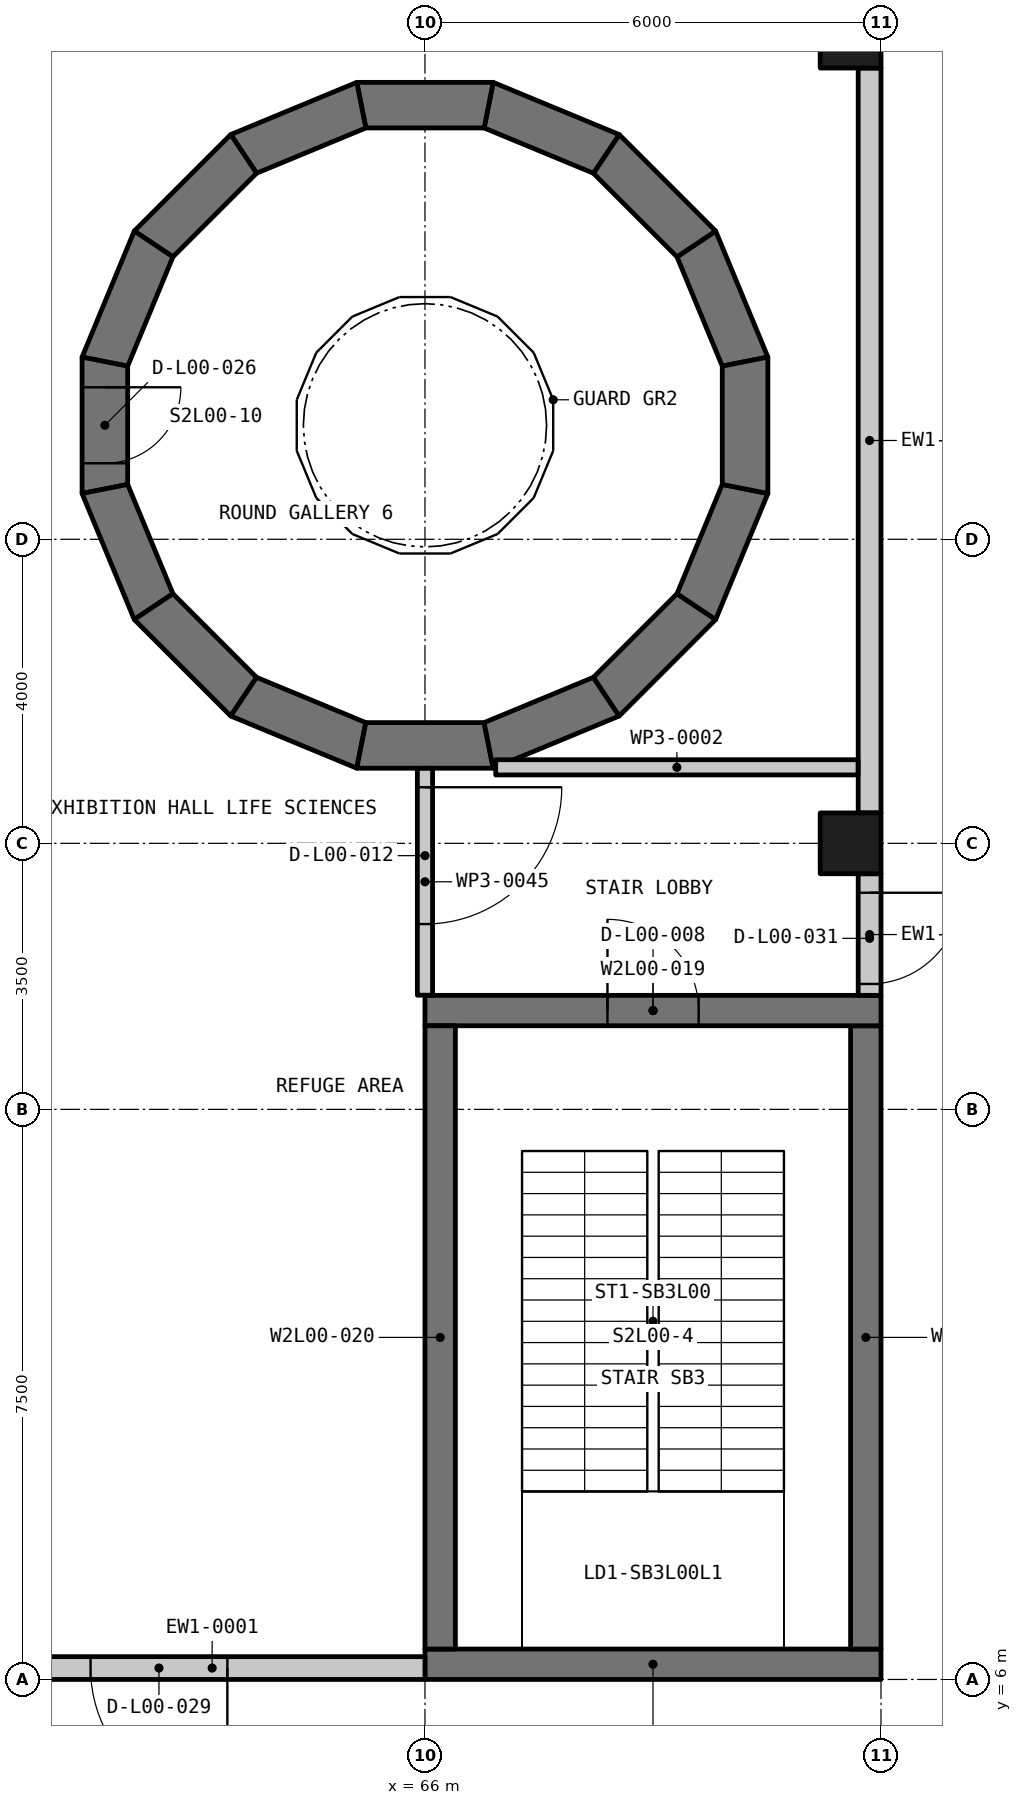
"""IFC4 building model, lengths in metres.
Left out: names, types, materials, properties, quantities, classifications, styles, units other than length and angle.
Written with IfcOpenShell. Run it as: python <this file> out.ifc"""

import sys

from ifc_helpers import new_model, si_unit, direction, frame, frame_2d, origin, origin_2d, place, context, subcontext, project, spatial, polyline, rectangle, outline, extrude, element, fill, save


model = new_model("IFC4")
c1 = context("Model", 3, precision=1e-05, world=origin(), true_north=direction((0.0, 1.0)))
c2 = subcontext(c1, "Body", "Model", "MODEL_VIEW")
j1 = project(units=[si_unit("LENGTHUNIT", "METRE"), si_unit("PLANEANGLEUNIT", "RADIAN")], contexts=[c1])
p1 = place(None, origin())
s1 = spatial("IfcSite", under=j1, at=p1, CompositionType="ELEMENT")
p2 = place(p1, origin())
s2 = spatial("IfcBuilding", under=s1, at=p2, CompositionType="ELEMENT")
p3 = place(p2, origin())
s3 = spatial("IfcBuildingStorey", under=s2, at=p3, CompositionType="ELEMENT", Elevation=0.0)
for number, where, z_axis, x_axis in (
    (1, (71.6, 17.0, -0.2), (0.0, 0.0, 1.0), (1.0, 0.0, 0.0)),
    (2, (71.6, 27.6, -0.2), (0.0, 0.0, 1.0), (1.0, 0.0, 0.0)),
):
    element("IfcColumn", number, at=place(p3, frame(where, z_axis=z_axis, x_axis=x_axis)), inside=s3, PredefinedType="COLUMN", context=c2, shape_type="SweptSolid", body=[
        extrude(rectangle(XDim=0.8, YDim=0.8, at=origin_2d()), origin(), (0.0, 0.0, 1.0), 5.9),
    ])
p4 = place(p3, frame((70.234, 23.283, -0.2), z_axis=(0.0, 0.0, 1.0), x_axis=(-0.3826441282, 0.92389581185, 0.0)))
e3 = element("IfcWall", 3, at=p4, inside=s3, PredefinedType="SHEAR", context=c2, shape_type="SweptSolid", body=[
    extrude(outline(polyline([(0.0, -0.3), (1.795, -0.3), (1.675, 0.3), (0.119, 0.3), (0.0, -0.3)])), origin(), (0.0, 0.0, 1.0), 5.9),
])
p5 = place(p3, frame((69.613, 24.844, -0.2), z_axis=(0.0, 0.0, 1.0), x_axis=(-0.707106781187, 0.707106781187, 0.0)))
e4 = element("IfcWall", 4, at=p5, inside=s3, PredefinedType="SHEAR", context=c2, shape_type="SweptSolid", body=[
    extrude(outline(polyline([(0.0, -0.3), (1.795, -0.3), (1.675, 0.3), (0.119, 0.3), (0.0, -0.3)])), origin(), (0.0, 0.0, 1.0), 5.9),
])
p6 = place(p3, frame((68.441, 26.048, -0.2), z_axis=(0.0, 0.0, 1.0), x_axis=(-0.92389581185, 0.3826441282, 0.0)))
e5 = element("IfcWall", 5, at=p6, inside=s3, PredefinedType="SHEAR", context=c2, shape_type="SweptSolid", body=[
    extrude(outline(polyline([(0.0, -0.3), (1.795, -0.3), (1.676, 0.3), (0.119, 0.3), (0.0, -0.3)])), origin(), (0.0, 0.0, 1.0), 5.9),
])
p7 = place(p3, frame((66.897, 26.712, -0.2), z_axis=(0.0, 0.0, 1.0), x_axis=(-1.0, 0.0, 0.0)))
e6 = element("IfcWall", 6, at=p7, inside=s3, PredefinedType="SHEAR", context=c2, shape_type="SweptSolid", body=[
    extrude(outline(polyline([(0.0, -0.3), (1.795, -0.3), (1.676, 0.3), (0.119, 0.3), (0.0, -0.3)])), origin(), (0.0, 0.0, 1.0), 5.9),
])
p8 = place(p3, frame((65.217, 26.734, -0.2), z_axis=(0.0, 0.0, 1.0), x_axis=(-0.92389581185, -0.3826441282, 0.0)))
e7 = element("IfcWall", 7, at=p8, inside=s3, PredefinedType="SHEAR", context=c2, shape_type="SweptSolid", body=[
    extrude(outline(polyline([(0.0, -0.3), (1.795, -0.3), (1.675, 0.3), (0.119, 0.3), (0.0, -0.3)])), origin(), (0.0, 0.0, 1.0), 5.9),
])
p9 = place(p3, frame((63.656, 26.113, -0.2), z_axis=(0.0, 0.0, 1.0), x_axis=(-0.707106781187, -0.707106781187, 0.0)))
e8 = element("IfcWall", 8, at=p9, inside=s3, PredefinedType="SHEAR", context=c2, shape_type="SweptSolid", body=[
    extrude(outline(polyline([(0.0, -0.3), (1.795, -0.3), (1.675, 0.3), (0.119, 0.3), (0.0, -0.3)])), origin(), (0.0, 0.0, 1.0), 5.9),
])
p10 = place(p3, frame((62.452, 24.941, -0.2), z_axis=(0.0, 0.0, 1.0), x_axis=(-0.3826441282, -0.92389581185, 0.0)))
e9 = element("IfcWall", 9, at=p10, inside=s3, PredefinedType="SHEAR", context=c2, shape_type="SweptSolid", body=[
    extrude(outline(polyline([(0.0, -0.3), (1.795, -0.3), (1.676, 0.3), (0.119, 0.3), (0.0, -0.3)])), origin(), (0.0, 0.0, 1.0), 5.9),
])
p11 = place(p3, frame((61.788, 23.397, -0.2), z_axis=(0.0, 0.0, 1.0), x_axis=(0.0, -1.0, 0.0)))
e10 = element("IfcWall", 10, at=p11, inside=s3, PredefinedType="SHEAR", context=c2, shape_type="SweptSolid", body=[
    extrude(outline(polyline([(0.0, -0.3), (1.795, -0.3), (1.676, 0.3), (0.119, 0.3), (0.0, -0.3)])), origin(), (0.0, 0.0, 1.0), 5.9),
])
p12 = place(p11, frame((0.397, 0.0, 0.2)))
e11 = element("IfcOpeningElement", 11, at=p12, cuts=e10, PredefinedType="OPENING", context=c2, shape_type="SweptSolid", body=[
    extrude(rectangle(XDim=1.0, YDim=2.2, at=frame_2d((0.5, 1.1))), frame((0.0, 0.31, 0.0), z_axis=(0.0, -1.0, 0.0), x_axis=(1.0, 0.0, 0.0)), (0.0, 0.0, 1.0), 0.62),
])
p13 = place(p3, frame((61.766, 21.717, -0.2), z_axis=(0.0, 0.0, 1.0), x_axis=(0.3826441282, -0.92389581185, 0.0)))
e12 = element("IfcWall", 12, at=p13, inside=s3, PredefinedType="SHEAR", context=c2, shape_type="SweptSolid", body=[
    extrude(outline(polyline([(0.0, -0.3), (1.795, -0.3), (1.675, 0.3), (0.119, 0.3), (0.0, -0.3)])), origin(), (0.0, 0.0, 1.0), 5.9),
])
p14 = place(p3, frame((62.387, 20.156, -0.2), z_axis=(0.0, 0.0, 1.0), x_axis=(0.707106781187, -0.707106781187, 0.0)))
e13 = element("IfcWall", 13, at=p14, inside=s3, PredefinedType="SHEAR", context=c2, shape_type="SweptSolid", body=[
    extrude(outline(polyline([(0.0, -0.3), (1.795, -0.3), (1.675, 0.3), (0.119, 0.3), (0.0, -0.3)])), origin(), (0.0, 0.0, 1.0), 5.9),
])
p15 = place(p3, frame((63.559, 18.952, -0.2), z_axis=(0.0, 0.0, 1.0), x_axis=(0.92389581185, -0.3826441282, 0.0)))
e14 = element("IfcWall", 14, at=p15, inside=s3, PredefinedType="SHEAR", context=c2, shape_type="SweptSolid", body=[
    extrude(outline(polyline([(0.0, -0.3), (1.795, -0.3), (1.676, 0.3), (0.119, 0.3), (0.0, -0.3)])), origin(), (0.0, 0.0, 1.0), 5.9),
])
p16 = place(p3, frame((65.103, 18.288, -0.2), z_axis=(0.0, 0.0, 1.0), x_axis=(1.0, 0.0, 0.0)))
e15 = element("IfcWall", 15, at=p16, inside=s3, PredefinedType="SHEAR", context=c2, shape_type="SweptSolid", body=[
    extrude(outline(polyline([(0.0, -0.3), (1.795, -0.3), (1.676, 0.3), (0.119, 0.3), (0.0, -0.3)])), origin(), (0.0, 0.0, 1.0), 5.9),
])
p17 = place(p3, frame((66.783, 18.266, -0.2), z_axis=(0.0, 0.0, 1.0), x_axis=(0.92389581185, 0.3826441282, 0.0)))
e16 = element("IfcWall", 16, at=p17, inside=s3, PredefinedType="SHEAR", context=c2, shape_type="SweptSolid", body=[
    extrude(outline(polyline([(0.0, -0.3), (1.795, -0.3), (1.675, 0.3), (0.119, 0.3), (0.0, -0.3)])), origin(), (0.0, 0.0, 1.0), 5.9),
])
p18 = place(p3, frame((68.344, 18.887, -0.2), z_axis=(0.0, 0.0, 1.0), x_axis=(0.707106781187, 0.707106781187, 0.0)))
e17 = element("IfcWall", 17, at=p18, inside=s3, PredefinedType="SHEAR", context=c2, shape_type="SweptSolid", body=[
    extrude(outline(polyline([(0.0, -0.3), (1.795, -0.3), (1.675, 0.3), (0.119, 0.3), (0.0, -0.3)])), origin(), (0.0, 0.0, 1.0), 5.9),
])
p19 = place(p3, frame((69.548, 20.059, -0.2), z_axis=(0.0, 0.0, 1.0), x_axis=(0.3826441282, 0.92389581185, 0.0)))
e18 = element("IfcWall", 18, at=p19, inside=s3, PredefinedType="SHEAR", context=c2, shape_type="SweptSolid", body=[
    extrude(outline(polyline([(0.0, -0.3), (1.795, -0.3), (1.676, 0.3), (0.119, 0.3), (0.0, -0.3)])), origin(), (0.0, 0.0, 1.0), 5.9),
])
p20 = place(p3, frame((70.212, 21.603, -0.2), z_axis=(0.0, 0.0, 1.0), x_axis=(0.0, 1.0, 0.0)))
e19 = element("IfcWall", 19, at=p20, inside=s3, PredefinedType="SHEAR", context=c2, shape_type="SweptSolid", body=[
    extrude(outline(polyline([(0.0, -0.3), (1.795, -0.3), (1.676, 0.3), (0.119, 0.3), (0.0, -0.3)])), origin(), (0.0, 0.0, 1.0), 5.9),
])
p21 = place(p3, frame((66.0, 6.2, -0.2), z_axis=(0.0, 0.0, 1.0), x_axis=(1.0, 0.0, 0.0)))
e20 = element("IfcWall", 20, at=p21, inside=s3, PredefinedType="SHEAR", context=c2, shape_type="SweptSolid", body=[
    extrude(rectangle(XDim=6.0, YDim=0.4, at=frame_2d((3.0, 0.0))), origin(), (0.0, 0.0, 1.0), 5.9),
])
p22 = place(p3, frame((71.8, 6.4, -0.2), z_axis=(0.0, 0.0, 1.0), x_axis=(0.0, 1.0, 0.0)))
e21 = element("IfcWall", 21, at=p22, inside=s3, PredefinedType="SHEAR", context=c2, shape_type="SweptSolid", body=[
    extrude(rectangle(XDim=8.2, YDim=0.4, at=frame_2d((4.1, 0.0))), origin(), (0.0, 0.0, 1.0), 5.9),
])
p23 = place(p3, frame((66.0, 14.8, -0.2), z_axis=(0.0, 0.0, 1.0), x_axis=(1.0, 0.0, 0.0)))
e22 = element("IfcWall", 22, at=p23, inside=s3, PredefinedType="SHEAR", context=c2, shape_type="SweptSolid", body=[
    extrude(rectangle(XDim=6.0, YDim=0.4, at=frame_2d((3.0, 0.0))), origin(), (0.0, 0.0, 1.0), 5.9),
])
p24 = place(p23, frame((2.401, 0.0, 0.2)))
e23 = element("IfcOpeningElement", 23, at=p24, cuts=e22, PredefinedType="OPENING", context=c2, shape_type="SweptSolid", body=[
    extrude(rectangle(XDim=1.2, YDim=2.2, at=frame_2d((0.6, 1.1))), frame((0.0, 0.21, 0.0), z_axis=(0.0, -1.0, 0.0), x_axis=(1.0, 0.0, 0.0)), (0.0, 0.0, 1.0), 0.42),
])
p25 = place(p3, frame((66.2, 6.4, -0.2), z_axis=(0.0, 0.0, 1.0), x_axis=(0.0, 1.0, 0.0)))
e24 = element("IfcWall", 24, at=p25, inside=s3, PredefinedType="SHEAR", context=c2, shape_type="SweptSolid", body=[
    extrude(rectangle(XDim=8.2, YDim=0.4, at=frame_2d((4.1, 0.0))), origin(), (0.0, 0.0, 1.0), 5.9),
])
p26 = place(p3, frame((66.0, 6.15, 0.0), z_axis=(0.0, 0.0, 1.0), x_axis=(-1.0, 0.0, 0.0)))
e25 = element("IfcWall", 25, at=p26, inside=s3, PredefinedType="SOLIDWALL", context=c2, shape_type="SweptSolid", body=[
    extrude(rectangle(XDim=5.6, YDim=0.3, at=frame_2d((2.8, 0.0))), origin(), (0.0, 0.0, 1.0), 4.8),
])
p27 = place(p26, frame((2.6, 0.0, 0.0)))
e26 = element("IfcOpeningElement", 26, at=p27, cuts=e25, PredefinedType="OPENING", context=c2, shape_type="SweptSolid", body=[
    extrude(rectangle(XDim=1.8, YDim=2.2, at=frame_2d((0.9, 1.1))), frame((0.0, 0.16, 0.0), z_axis=(0.0, -1.0, 0.0), x_axis=(1.0, 0.0, 0.0)), (0.0, 0.0, 1.0), 0.32),
])
p28 = place(p3, frame((71.85, 27.2, 0.0), z_axis=(0.0, 0.0, 1.0), x_axis=(0.0, -1.0, 0.0)))
e27 = element("IfcWall", 27, at=p28, inside=s3, PredefinedType="SOLIDWALL", context=c2, shape_type="SweptSolid", body=[
    extrude(rectangle(XDim=9.8, YDim=0.3, at=frame_2d((4.9, 0.0))), origin(), (0.0, 0.0, 1.0), 4.8),
])
p29 = place(p3, frame((71.85, 16.6, 0.0), z_axis=(0.0, 0.0, 1.0), x_axis=(0.0, -1.0, 0.0)))
e28 = element("IfcWall", 28, at=p29, inside=s3, PredefinedType="SOLIDWALL", context=c2, shape_type="SweptSolid", body=[
    extrude(rectangle(XDim=1.6, YDim=0.3, at=frame_2d((0.8, 0.0))), origin(), (0.0, 0.0, 1.0), 4.8),
])
p30 = place(p29, frame((0.25, 0.0, 0.0)))
e29 = element("IfcOpeningElement", 29, at=p30, cuts=e28, PredefinedType="OPENING", context=c2, shape_type="SweptSolid", body=[
    extrude(rectangle(XDim=1.2, YDim=2.2, at=frame_2d((0.6, 1.1))), frame((0.0, 0.16, 0.0), z_axis=(0.0, -1.0, 0.0), x_axis=(1.0, 0.0, 0.0)), (0.0, 0.0, 1.0), 0.32),
])
p31 = place(p3, frame((66.931, 18.0, 0.0), z_axis=(0.0, 0.0, 1.0), x_axis=(1.0, 0.0, 0.0)))
e30 = element("IfcWall", 30, at=p31, inside=s3, PredefinedType="PARTITIONING", context=c2, shape_type="SweptSolid", body=[
    extrude(rectangle(XDim=4.767, YDim=0.2, at=frame_2d((2.384, 0.0))), origin(), (0.0, 0.0, 1.0), 4.8),
])
p32 = place(p3, frame((66.0, 17.986, 0.0), z_axis=(0.0, 0.0, 1.0), x_axis=(0.0, -1.0, 0.0)))
e31 = element("IfcWall", 31, at=p32, inside=s3, PredefinedType="PARTITIONING", context=c2, shape_type="SweptSolid", body=[
    extrude(rectangle(XDim=2.984, YDim=0.2, at=frame_2d((1.492, 0.0))), origin(), (0.0, 0.0, 1.0), 4.8),
])
p33 = place(p32, frame((0.248, 0.0, 0.0)))
e32 = element("IfcOpeningElement", 32, at=p33, cuts=e31, PredefinedType="OPENING", context=c2, shape_type="SweptSolid", body=[
    extrude(rectangle(XDim=1.8, YDim=2.1, at=frame_2d((0.9, 1.05))), frame((0.0, 0.11, 0.0), z_axis=(0.0, -1.0, 0.0), x_axis=(1.0, 0.0, 0.0)), (0.0, 0.0, 1.0), 0.22),
])
p34 = place(p27, origin())
e33 = element("IfcDoor", 33, at=p34, inside=s3, OperationType="SINGLE_SWING_LEFT", PredefinedType="DOOR", context=c2, shape_type="SweptSolid", body=[
    extrude(rectangle(XDim=1.8, YDim=2.2, at=frame_2d((0.9, 1.1))), frame((0.0, 0.025, 0.0), z_axis=(0.0, -1.0, 0.0), x_axis=(1.0, 0.0, 0.0)), (0.0, 0.0, 1.0), 0.05),
])
fill(e26, e33)
p35 = place(p30, origin())
e34 = element("IfcDoor", 34, at=p35, inside=s3, OperationType="SINGLE_SWING_RIGHT", PredefinedType="DOOR", context=c2, shape_type="SweptSolid", body=[
    extrude(rectangle(XDim=1.2, YDim=2.2, at=frame_2d((0.6, 1.1))), frame((0.0, 0.025, 0.0), z_axis=(0.0, -1.0, 0.0), x_axis=(1.0, 0.0, 0.0)), (0.0, 0.0, 1.0), 0.05),
])
fill(e29, e34)
p36 = place(p24, origin())
e35 = element("IfcDoor", 35, at=p36, inside=s3, OperationType="SINGLE_SWING_RIGHT", PredefinedType="DOOR", context=c2, shape_type="SweptSolid", body=[
    extrude(rectangle(XDim=1.2, YDim=2.2, at=frame_2d((0.6, 1.1))), frame((0.0, 0.025, 0.0), z_axis=(0.0, -1.0, 0.0), x_axis=(1.0, 0.0, 0.0)), (0.0, 0.0, 1.0), 0.05),
])
fill(e23, e35)
p37 = place(p33, origin())
e36 = element("IfcDoor", 36, at=p37, inside=s3, OperationType="DOUBLE_DOOR_SINGLE_SWING", PredefinedType="DOOR", context=c2, shape_type="SweptSolid", body=[
    extrude(rectangle(XDim=1.8, YDim=2.1, at=frame_2d((0.9, 1.05))), frame((0.0, 0.025, 0.0), z_axis=(0.0, -1.0, 0.0), x_axis=(1.0, 0.0, 0.0)), (0.0, 0.0, 1.0), 0.05),
])
fill(e32, e36)
p38 = place(p12, origin())
e37 = element("IfcDoor", 37, at=p38, inside=s3, OperationType="SINGLE_SWING_LEFT", PredefinedType="DOOR", context=c2, shape_type="SweptSolid", body=[
    extrude(rectangle(XDim=1.0, YDim=2.2, at=frame_2d((0.5, 1.1))), frame((0.0, 0.025, 0.0), z_axis=(0.0, -1.0, 0.0), x_axis=(1.0, 0.0, 0.0)), (0.0, 0.0, 1.0), 0.05),
])
fill(e11, e37)
save(model, sys.argv[1])
